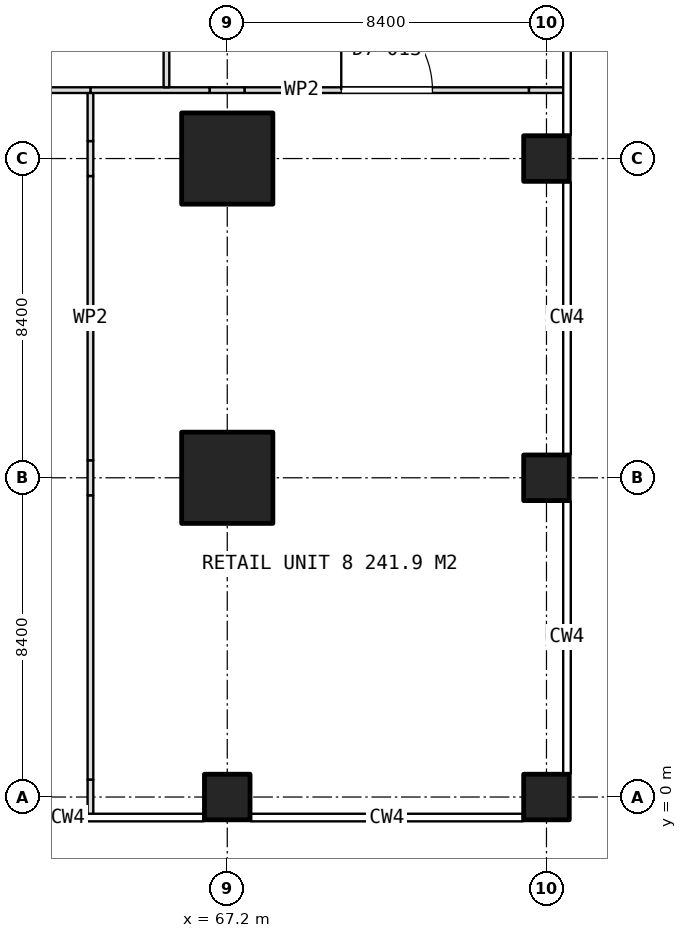
"""IFC4 building model, lengths in metres.
Left out: names, types, materials, properties, quantities, classifications, styles, units other than length and angle.
Written with IfcOpenShell. Run it as: python <this file> out.ifc"""

import sys

from ifc_helpers import new_model, si_unit, direction, frame, frame_2d, origin, origin_2d, place, context, subcontext, project, spatial, rectangle, extrude, element, fill, save


model = new_model("IFC4")
c1 = context("Model", 3, precision=1e-05, world=origin(), true_north=direction((0.0, 1.0)))
c2 = subcontext(c1, "Body", "Model", "MODEL_VIEW")
j1 = project(units=[si_unit("LENGTHUNIT", "METRE"), si_unit("PLANEANGLEUNIT", "RADIAN")], contexts=[c1])
p1 = place(None, origin())
s1 = spatial("IfcSite", under=j1, at=p1, CompositionType="ELEMENT")
p2 = place(p1, origin())
s2 = spatial("IfcBuilding", under=s1, at=p2, CompositionType="ELEMENT")
p3 = place(p2, frame((0.0, 0.0, 5.4)))
s3 = spatial("IfcBuildingStorey", under=s2, at=p3, CompositionType="ELEMENT", Elevation=5.4)
p4 = place(p3, frame((67.2, 0.0, 0.0), z_axis=(0.0, 0.0, 1.0), x_axis=(1.0, 0.0, 0.0)))
e1 = element("IfcColumn", 1, at=p4, inside=s3, PredefinedType="COLUMN", context=c2, shape_type="SweptSolid", body=[
    extrude(rectangle(XDim=1.2, YDim=1.2, at=origin_2d()), origin(), (0.0, 0.0, 1.0), 5.0),
])
for number, where, z_axis, x_axis in (
    (2, (67.2, 8.4, 0.0), (0.0, 0.0, 1.0), (1.0, 0.0, 0.0)),
    (3, (67.2, 16.8, 0.0), (0.0, 0.0, 1.0), (1.0, 0.0, 0.0)),
):
    element("IfcColumn", number, at=place(p3, frame(where, z_axis=z_axis, x_axis=x_axis)), inside=s3, PredefinedType="COLUMN", context=c2, shape_type="SweptSolid", body=[
        extrude(rectangle(XDim=2.4, YDim=2.4, at=origin_2d()), origin(), (0.0, 0.0, 1.0), 5.0),
    ])
for number, where, z_axis, x_axis in (
    (4, (75.6, 0.0, 0.0), (0.0, 0.0, 1.0), (1.0, 0.0, 0.0)),
    (5, (75.6, 8.4, 0.0), (0.0, 0.0, 1.0), (1.0, 0.0, 0.0)),
    (6, (75.6, 16.8, 0.0), (0.0, 0.0, 1.0), (1.0, 0.0, 0.0)),
):
    element("IfcColumn", number, at=place(p3, frame(where, z_axis=z_axis, x_axis=x_axis)), inside=s3, PredefinedType="COLUMN", context=c2, shape_type="SweptSolid", body=[
        extrude(rectangle(XDim=1.2, YDim=1.2, at=origin_2d()), origin(), (0.0, 0.0, 1.0), 5.0),
    ])
p5 = place(p3, frame((63.6, -0.49, 0.0), z_axis=(0.0, 0.0, 1.0), x_axis=(0.0, 1.0, 0.0)))
e7 = element("IfcWall", 7, at=p5, inside=s3, PredefinedType="PARTITIONING", context=c2, shape_type="SweptSolid", body=[
    extrude(rectangle(XDim=0.95, YDim=0.15, at=frame_2d((0.475, 0.0))), origin(), (0.0, 0.0, 1.0), 2.9),
])
p6 = place(p3, frame((63.6, 0.46, 0.0), z_axis=(0.0, 0.0, 1.0), x_axis=(0.0, 1.0, 0.0)))
e8 = element("IfcWall", 8, at=p6, inside=s3, PredefinedType="PARTITIONING", context=c2, shape_type="SweptSolid", body=[
    extrude(rectangle(XDim=7.48, YDim=0.15, at=frame_2d((3.74, 0.0))), origin(), (0.0, 0.0, 1.0), 4.7),
])
p7 = place(p3, frame((63.6, 7.94, 0.0), z_axis=(0.0, 0.0, 1.0), x_axis=(0.0, 1.0, 0.0)))
e9 = element("IfcWall", 9, at=p7, inside=s3, PredefinedType="PARTITIONING", context=c2, shape_type="SweptSolid", body=[
    extrude(rectangle(XDim=0.92, YDim=0.15, at=frame_2d((0.46, 0.0))), origin(), (0.0, 0.0, 1.0), 2.9),
])
p8 = place(p3, frame((63.6, 8.86, 0.0), z_axis=(0.0, 0.0, 1.0), x_axis=(0.0, 1.0, 0.0)))
e10 = element("IfcWall", 10, at=p8, inside=s3, PredefinedType="PARTITIONING", context=c2, shape_type="SweptSolid", body=[
    extrude(rectangle(XDim=7.48, YDim=0.15, at=frame_2d((3.74, 0.0))), origin(), (0.0, 0.0, 1.0), 4.7),
])
p9 = place(p3, frame((63.6, 16.34, 0.0), z_axis=(0.0, 0.0, 1.0), x_axis=(0.0, 1.0, 0.0)))
e11 = element("IfcWall", 11, at=p9, inside=s3, PredefinedType="PARTITIONING", context=c2, shape_type="SweptSolid", body=[
    extrude(rectangle(XDim=0.92, YDim=0.15, at=frame_2d((0.46, 0.0))), origin(), (0.0, 0.0, 1.0), 2.9),
])
p10 = place(p3, frame((63.6, 17.26, 0.0), z_axis=(0.0, 0.0, 1.0), x_axis=(0.0, 1.0, 0.0)))
e12 = element("IfcWall", 12, at=p10, inside=s3, PredefinedType="PARTITIONING", context=c2, shape_type="SweptSolid", body=[
    extrude(rectangle(XDim=1.34, YDim=0.15, at=frame_2d((0.67, 0.0))), origin(), (0.0, 0.0, 1.0), 4.7),
])
p11 = place(p3, frame((63.6, 18.6, 0.0), z_axis=(0.0, 0.0, 1.0), x_axis=(1.0, 0.0, 0.0)))
e13 = element("IfcWall", 13, at=p11, inside=s3, PredefinedType="PARTITIONING", context=c2, shape_type="SweptSolid", body=[
    extrude(rectangle(XDim=3.14, YDim=0.15, at=frame_2d((1.57, 0.0))), origin(), (0.0, 0.0, 1.0), 4.7),
])
p12 = place(p3, frame((66.74, 18.6, 0.0), z_axis=(0.0, 0.0, 1.0), x_axis=(1.0, 0.0, 0.0)))
e14 = element("IfcWall", 14, at=p12, inside=s3, PredefinedType="PARTITIONING", context=c2, shape_type="SweptSolid", body=[
    extrude(rectangle(XDim=0.92, YDim=0.15, at=frame_2d((0.46, 0.0))), origin(), (0.0, 0.0, 1.0), 2.9),
])
p13 = place(p3, frame((67.66, 18.6, 0.0), z_axis=(0.0, 0.0, 1.0), x_axis=(1.0, 0.0, 0.0)))
e15 = element("IfcWall", 15, at=p13, inside=s3, PredefinedType="PARTITIONING", context=c2, shape_type="SweptSolid", body=[
    extrude(rectangle(XDim=7.48, YDim=0.15, at=frame_2d((3.74, 0.0))), origin(), (0.0, 0.0, 1.0), 4.7),
])
p14 = place(p13, frame((2.54, 0.0, 0.0)))
e16 = element("IfcOpeningElement", 16, at=p14, cuts=e15, PredefinedType="OPENING", context=c2, shape_type="SweptSolid", body=[
    extrude(rectangle(XDim=2.4, YDim=2.4, at=frame_2d((1.2, 1.2))), frame((0.0, 0.085, 0.0), z_axis=(0.0, -1.0, 0.0), x_axis=(1.0, 0.0, 0.0)), (0.0, 0.0, 1.0), 0.17),
])
p15 = place(p3, frame((75.14, 18.6, 0.0), z_axis=(0.0, 0.0, 1.0), x_axis=(1.0, 0.0, 0.0)))
e17 = element("IfcWall", 17, at=p15, inside=s3, PredefinedType="PARTITIONING", context=c2, shape_type="SweptSolid", body=[
    extrude(rectangle(XDim=0.95, YDim=0.15, at=frame_2d((0.475, 0.0))), origin(), (0.0, 0.0, 1.0), 2.9),
])
p16 = place(p3, frame((65.6, 24.74, 0.0), z_axis=(0.0, 0.0, 1.0), x_axis=(0.0, -1.0, 0.0)))
e18 = element("IfcWall", 18, at=p16, inside=s3, PredefinedType="PARTITIONING", context=c2, shape_type="SweptSolid", body=[
    extrude(rectangle(XDim=6.065, YDim=0.15, at=frame_2d((3.032, 0.0))), origin(), (0.0, 0.0, 1.0), 4.7),
])
p17 = place(p3, frame((63.6, 18.6, 0.0), z_axis=(0.0, 0.0, 1.0), x_axis=(-1.0, 0.0, 0.0)))
e19 = element("IfcWall", 19, at=p17, inside=s3, PredefinedType="PARTITIONING", context=c2, shape_type="SweptSolid", body=[
    extrude(rectangle(XDim=4.34, YDim=0.15, at=frame_2d((2.17, 0.0))), origin(), (0.0, 0.0, 1.0), 4.7),
])
p18 = place(p14, origin())
e20 = element("IfcDoor", 20, at=p18, inside=s3, OperationType="DOUBLE_DOOR_SINGLE_SWING", PredefinedType="DOOR", context=c2, shape_type="SweptSolid", body=[
    extrude(rectangle(XDim=2.4, YDim=2.4, at=frame_2d((1.2, 1.2))), frame((0.0, 0.025, 0.0), z_axis=(0.0, -1.0, 0.0), x_axis=(1.0, 0.0, 0.0)), (0.0, 0.0, 1.0), 0.05),
])
fill(e16, e20)
save(model, sys.argv[1])
